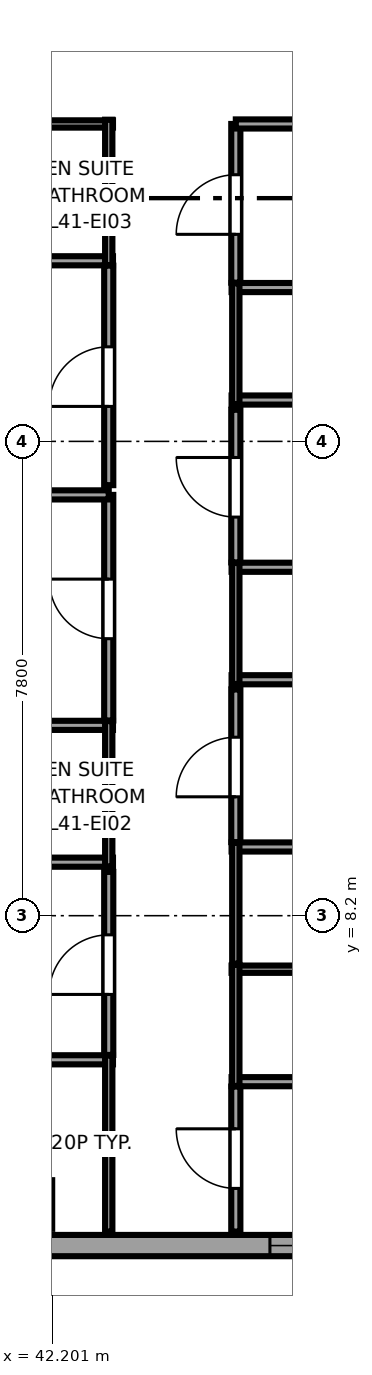
"""IFC4 building model, lengths in metres.
Left out: names, types, materials, properties, quantities, classifications, styles, units other than length and angle.
Written with IfcOpenShell. Run it as: python <this file> out.ifc"""

import sys

from ifc_helpers import new_model, si_unit, direction, frame, frame_2d, origin, origin_2d, place, context, subcontext, project, spatial, rectangle, extrude, source, transform, mapped, element, fill, save


model = new_model("IFC4")
c1 = context("Model", 3, precision=1e-05, world=origin(), true_north=direction((0.0, 1.0)))
c2 = subcontext(c1, "Body", "Model", "MODEL_VIEW")
j1 = project(units=[si_unit("LENGTHUNIT", "METRE"), si_unit("PLANEANGLEUNIT", "RADIAN")], contexts=[c1])
p1 = place(None, origin())
s1 = spatial("IfcSite", under=j1, at=p1, CompositionType="ELEMENT")
p2 = place(p1, origin())
s2 = spatial("IfcBuilding", under=s1, at=p2, CompositionType="ELEMENT")
p3 = place(p2, frame((0.0, 0.0, 157.7)))
s3 = spatial("IfcBuildingStorey", under=s2, at=p3, CompositionType="ELEMENT", Elevation=157.7)
m1 = source(origin(), c2, "Body", "SweptSolid", [
    extrude(rectangle(XDim=0.8, YDim=0.8, at=origin_2d()), origin(), (0.0, 0.0, 1.0), 3.55),
])
p4 = place(p3, frame((41.8, 3.45, 0.0), z_axis=(0.0, 0.0, 1.0), x_axis=(1.0, 0.0, 0.0)))
e1 = element("IfcColumn", 1, at=p4, inside=s3, PredefinedType="COLUMN", context=c2, shape_type="MappedRepresentation", body=[
    mapped(m1, transform((0.0, 0.0, 0.0), x_axis=(1.0, 0.0, 0.0), y_axis=(0.0, 1.0, 0.0), z_axis=(0.0, 0.0, 1.0), scale=1.0)),
])
p5 = place(p3, frame((34.375, 2.775, 0.0), z_axis=(0.0, 0.0, 1.0), x_axis=(1.0, 0.0, 0.0)))
e2 = element("IfcWall", 2, at=p5, inside=s3, PredefinedType="SOLIDWALL", context=c2, shape_type="SweptSolid", body=[
    extrude(rectangle(XDim=15.608, YDim=0.35, at=frame_2d((7.804, 0.0))), origin(), (0.0, 0.0, 1.0), 3.37),
])
p6 = place(p5, frame((1.801, 0.0, 0.68)))
e3 = element("IfcOpeningElement", 3, at=p6, cuts=e2, PredefinedType="OPENING", context=c2, shape_type="SweptSolid", body=[
    extrude(rectangle(XDim=2.4, YDim=1.9, at=frame_2d((1.2, 0.95))), frame((0.0, 0.185, 0.0), z_axis=(0.0, -1.0, 0.0), x_axis=(1.0, 0.0, 0.0)), (0.0, 0.0, 1.0), 0.37),
])
p7 = place(p5, frame((11.406, 0.0, 0.68)))
e4 = element("IfcOpeningElement", 4, at=p7, cuts=e2, PredefinedType="OPENING", context=c2, shape_type="SweptSolid", body=[
    extrude(rectangle(XDim=2.4, YDim=1.9, at=frame_2d((1.2, 0.95))), frame((0.0, 0.185, 0.0), z_axis=(0.0, -1.0, 0.0), x_axis=(1.0, 0.0, 0.0)), (0.0, 0.0, 1.0), 0.37),
])
p8 = place(p3, frame((39.46, 5.83, 0.0), z_axis=(0.0, 0.0, 1.0), x_axis=(1.0, 0.0, 0.0)))
e5 = element("IfcWall", 5, at=p8, inside=s3, PredefinedType="PARTITIONING", context=c2, shape_type="SweptSolid", body=[
    extrude(rectangle(XDim=3.74, YDim=0.15, at=frame_2d((1.87, 0.0))), origin(), (0.0, 0.0, 1.0), 3.37),
])
p9 = place(p3, frame((43.13, 3.005, 0.0), z_axis=(0.0, 0.0, 1.0), x_axis=(0.0, 1.0, 0.0)))
e6 = element("IfcWall", 6, at=p9, inside=s3, PredefinedType="PLUMBINGWALL", context=c2, shape_type="SweptSolid", body=[
    extrude(rectangle(XDim=2.895, YDim=0.12, at=frame_2d((1.448, 0.0))), origin(), (0.0, 0.0, 1.0), 3.37),
])
p10 = place(p3, frame((34.65, 9.08, 0.0), z_axis=(0.0, 0.0, 1.0), x_axis=(1.0, 0.0, 0.0)))
e7 = element("IfcWall", 7, at=p10, inside=s3, PredefinedType="PARTITIONING", context=c2, shape_type="SweptSolid", body=[
    extrude(rectangle(XDim=8.55, YDim=0.15, at=frame_2d((4.275, 0.0))), origin(), (0.0, 0.0, 1.0), 3.37),
])
p11 = place(p3, frame((40.61, 11.33, 0.0), z_axis=(0.0, 0.0, 1.0), x_axis=(1.0, 0.0, 0.0)))
e8 = element("IfcWall", 8, at=p11, inside=s3, PredefinedType="PARTITIONING", context=c2, shape_type="SweptSolid", body=[
    extrude(rectangle(XDim=2.59, YDim=0.15, at=frame_2d((1.295, 0.0))), origin(), (0.0, 0.0, 1.0), 3.37),
])
p12 = place(p3, frame((43.13, 9.01, 0.0), z_axis=(0.0, 0.0, 1.0), x_axis=(0.0, 1.0, 0.0)))
e9 = element("IfcWall", 9, at=p12, inside=s3, PredefinedType="PLUMBINGWALL", context=c2, shape_type="SweptSolid", body=[
    extrude(rectangle(XDim=2.39, YDim=0.12, at=frame_2d((1.195, 0.0))), origin(), (0.0, 0.0, 1.0), 3.37),
])
p13 = place(p3, frame((40.61, 18.97, 0.0), z_axis=(0.0, 0.0, 1.0), x_axis=(1.0, 0.0, 0.0)))
e10 = element("IfcWall", 10, at=p13, inside=s3, PredefinedType="PARTITIONING", context=c2, shape_type="SweptSolid", body=[
    extrude(rectangle(XDim=2.59, YDim=0.15, at=frame_2d((1.295, 0.0))), origin(), (0.0, 0.0, 1.0), 3.37),
])
p14 = place(p3, frame((40.61, 21.22, 0.0), z_axis=(0.0, 0.0, 1.0), x_axis=(1.0, 0.0, 0.0)))
e11 = element("IfcWall", 11, at=p14, inside=s3, PredefinedType="PLUMBINGWALL", context=c2, shape_type="SweptSolid", body=[
    extrude(rectangle(XDim=2.59, YDim=0.12, at=frame_2d((1.295, 0.0))), origin(), (0.0, 0.0, 1.0), 3.37),
])
p15 = place(p3, frame((43.13, 18.9, 0.0), z_axis=(0.0, 0.0, 1.0), x_axis=(0.0, 1.0, 0.0)))
e12 = element("IfcWall", 12, at=p15, inside=s3, PredefinedType="PLUMBINGWALL", context=c2, shape_type="SweptSolid", body=[
    extrude(rectangle(XDim=2.39, YDim=0.12, at=frame_2d((1.195, 0.0))), origin(), (0.0, 0.0, 1.0), 3.37),
])
p16 = place(p3, frame((45.15, 5.47, 0.0), z_axis=(0.0, 0.0, 1.0), x_axis=(1.0, 0.0, 0.0)))
e13 = element("IfcWall", 13, at=p16, inside=s3, PredefinedType="PARTITIONING", context=c2, shape_type="SweptSolid", body=[
    extrude(rectangle(XDim=2.59, YDim=0.15, at=frame_2d((1.295, 0.0))), origin(), (0.0, 0.0, 1.0), 3.37),
])
p17 = place(p3, frame((45.15, 7.32, 0.0), z_axis=(0.0, 0.0, 1.0), x_axis=(1.0, 0.0, 0.0)))
e14 = element("IfcWall", 14, at=p17, inside=s3, PredefinedType="PLUMBINGWALL", context=c2, shape_type="SweptSolid", body=[
    extrude(rectangle(XDim=2.59, YDim=0.12, at=frame_2d((1.295, 0.0))), origin(), (0.0, 0.0, 1.0), 3.37),
])
p18 = place(p3, frame((45.22, 5.4, 0.0), z_axis=(0.0, 0.0, 1.0), x_axis=(0.0, 1.0, 0.0)))
e15 = element("IfcWall", 15, at=p18, inside=s3, PredefinedType="PLUMBINGWALL", context=c2, shape_type="SweptSolid", body=[
    extrude(rectangle(XDim=1.99, YDim=0.12, at=frame_2d((0.995, 0.0))), origin(), (0.0, 0.0, 1.0), 3.37),
])
p19 = place(p3, frame((45.15, 9.33, 0.0), z_axis=(0.0, 0.0, 1.0), x_axis=(1.0, 0.0, 0.0)))
e16 = element("IfcWall", 16, at=p19, inside=s3, PredefinedType="PARTITIONING", context=c2, shape_type="SweptSolid", body=[
    extrude(rectangle(XDim=2.59, YDim=0.15, at=frame_2d((1.295, 0.0))), origin(), (0.0, 0.0, 1.0), 3.37),
])
p20 = place(p3, frame((45.22, 7.41, 0.0), z_axis=(0.0, 0.0, 1.0), x_axis=(0.0, 1.0, 0.0)))
e17 = element("IfcWall", 17, at=p20, inside=s3, PredefinedType="PLUMBINGWALL", context=c2, shape_type="SweptSolid", body=[
    extrude(rectangle(XDim=1.99, YDim=0.12, at=frame_2d((0.995, 0.0))), origin(), (0.0, 0.0, 1.0), 3.37),
])
p21 = place(p3, frame((45.15, 12.08, 0.0), z_axis=(0.0, 0.0, 1.0), x_axis=(1.0, 0.0, 0.0)))
e18 = element("IfcWall", 18, at=p21, inside=s3, PredefinedType="PARTITIONING", context=c2, shape_type="SweptSolid", body=[
    extrude(rectangle(XDim=8.845, YDim=0.15, at=frame_2d((4.423, 0.0))), origin(), (0.0, 0.0, 1.0), 3.37),
])
p22 = place(p3, frame((45.15, 13.93, 0.0), z_axis=(0.0, 0.0, 1.0), x_axis=(1.0, 0.0, 0.0)))
e19 = element("IfcWall", 19, at=p22, inside=s3, PredefinedType="PARTITIONING", context=c2, shape_type="SweptSolid", body=[
    extrude(rectangle(XDim=2.59, YDim=0.15, at=frame_2d((1.295, 0.0))), origin(), (0.0, 0.0, 1.0), 3.37),
])
p23 = place(p3, frame((45.22, 12.01, 0.0), z_axis=(0.0, 0.0, 1.0), x_axis=(0.0, 1.0, 0.0)))
e20 = element("IfcWall", 20, at=p23, inside=s3, PredefinedType="PLUMBINGWALL", context=c2, shape_type="SweptSolid", body=[
    extrude(rectangle(XDim=1.99, YDim=0.12, at=frame_2d((0.995, 0.0))), origin(), (0.0, 0.0, 1.0), 3.37),
])
p24 = place(p3, frame((45.15, 16.68, 0.0), z_axis=(0.0, 0.0, 1.0), x_axis=(1.0, 0.0, 0.0)))
e21 = element("IfcWall", 21, at=p24, inside=s3, PredefinedType="PARTITIONING", context=c2, shape_type="SweptSolid", body=[
    extrude(rectangle(XDim=8.845, YDim=0.15, at=frame_2d((4.423, 0.0))), origin(), (0.0, 0.0, 1.0), 3.37),
])
p25 = place(p3, frame((45.15, 18.53, 0.0), z_axis=(0.0, 0.0, 1.0), x_axis=(1.0, 0.0, 0.0)))
e22 = element("IfcWall", 22, at=p25, inside=s3, PredefinedType="PARTITIONING", context=c2, shape_type="SweptSolid", body=[
    extrude(rectangle(XDim=2.59, YDim=0.15, at=frame_2d((1.295, 0.0))), origin(), (0.0, 0.0, 1.0), 3.37),
])
p26 = place(p3, frame((45.22, 16.61, 0.0), z_axis=(0.0, 0.0, 1.0), x_axis=(0.0, 1.0, 0.0)))
e23 = element("IfcWall", 23, at=p26, inside=s3, PredefinedType="PLUMBINGWALL", context=c2, shape_type="SweptSolid", body=[
    extrude(rectangle(XDim=1.99, YDim=0.12, at=frame_2d((0.995, 0.0))), origin(), (0.0, 0.0, 1.0), 3.37),
])
p27 = place(p3, frame((43.13, 5.91, 0.0), z_axis=(0.0, 0.0, 1.0), x_axis=(0.0, 1.0, 0.0)))
e24 = element("IfcWall", 24, at=p27, inside=s3, PredefinedType="PARTITIONING", context=c2, shape_type="SweptSolid", body=[
    extrude(rectangle(XDim=3.01, YDim=0.15, at=frame_2d((1.505, 0.0))), origin(), (0.0, 0.0, 1.0), 3.37),
])
p28 = place(p27, frame((0.995, 0.0, 0.0)))
e25 = element("IfcOpeningElement", 25, at=p28, cuts=e24, PredefinedType="OPENING", context=c2, shape_type="SweptSolid", body=[
    extrude(rectangle(XDim=0.98, YDim=2.12, at=frame_2d((0.49, 1.06))), frame((0.0, 0.085, 0.0), z_axis=(0.0, -1.0, 0.0), x_axis=(1.0, 0.0, 0.0)), (0.0, 0.0, 1.0), 0.17),
])
p29 = place(p3, frame((43.13, 11.41, 0.0), z_axis=(0.0, 0.0, 1.0), x_axis=(0.0, 1.0, 0.0)))
e26 = element("IfcWall", 26, at=p29, inside=s3, PredefinedType="PARTITIONING", context=c2, shape_type="SweptSolid", body=[
    extrude(rectangle(XDim=3.71, YDim=0.15, at=frame_2d((1.855, 0.0))), origin(), (0.0, 0.0, 1.0), 3.37),
])
p30 = place(p29, frame((1.345, 0.0, 0.0)))
e27 = element("IfcOpeningElement", 27, at=p30, cuts=e26, PredefinedType="OPENING", context=c2, shape_type="SweptSolid", body=[
    extrude(rectangle(XDim=0.98, YDim=2.12, at=frame_2d((0.49, 1.06))), frame((0.0, 0.085, 0.0), z_axis=(0.0, -1.0, 0.0), x_axis=(1.0, 0.0, 0.0)), (0.0, 0.0, 1.0), 0.17),
])
p31 = place(p3, frame((34.65, 15.12, 0.0), z_axis=(0.0, 0.0, 1.0), x_axis=(1.0, 0.0, 0.0)))
e28 = element("IfcWall", 28, at=p31, inside=s3, PredefinedType="PARTITIONING", context=c2, shape_type="SweptSolid", body=[
    extrude(rectangle(XDim=8.48, YDim=0.15, at=frame_2d((4.24, 0.0))), origin(), (0.0, 0.0, 1.0), 3.37),
])
p32 = place(p3, frame((43.13, 15.28, 0.0), z_axis=(0.0, 0.0, 1.0), x_axis=(0.0, 1.0, 0.0)))
e29 = element("IfcWall", 29, at=p32, inside=s3, PredefinedType="PARTITIONING", context=c2, shape_type="SweptSolid", body=[
    extrude(rectangle(XDim=3.61, YDim=0.15, at=frame_2d((1.805, 0.0))), origin(), (0.0, 0.0, 1.0), 3.37),
])
p33 = place(p32, frame((1.295, 0.0, 0.0)))
e30 = element("IfcOpeningElement", 30, at=p33, cuts=e29, PredefinedType="OPENING", context=c2, shape_type="SweptSolid", body=[
    extrude(rectangle(XDim=0.98, YDim=2.12, at=frame_2d((0.49, 1.06))), frame((0.0, 0.085, 0.0), z_axis=(0.0, -1.0, 0.0), x_axis=(1.0, 0.0, 0.0)), (0.0, 0.0, 1.0), 0.17),
])
p34 = place(p3, frame((45.22, 3.005, 0.0), z_axis=(0.0, 0.0, 1.0), x_axis=(0.0, 1.0, 0.0)))
e31 = element("IfcWall", 31, at=p34, inside=s3, PredefinedType="PARTITIONING", context=c2, shape_type="SweptSolid", body=[
    extrude(rectangle(XDim=2.385, YDim=0.15, at=frame_2d((1.192, 0.0))), origin(), (0.0, 0.0, 1.0), 3.37),
])
p35 = place(p34, frame((0.71, 0.0, 0.0)))
e32 = element("IfcOpeningElement", 32, at=p35, cuts=e31, PredefinedType="OPENING", context=c2, shape_type="SweptSolid", body=[
    extrude(rectangle(XDim=0.98, YDim=2.12, at=frame_2d((0.49, 1.06))), frame((0.0, 0.085, 0.0), z_axis=(0.0, -1.0, 0.0), x_axis=(1.0, 0.0, 0.0)), (0.0, 0.0, 1.0), 0.17),
])
p36 = place(p3, frame((45.22, 9.41, 0.0), z_axis=(0.0, 0.0, 1.0), x_axis=(0.0, 1.0, 0.0)))
e33 = element("IfcWall", 33, at=p36, inside=s3, PredefinedType="PARTITIONING", context=c2, shape_type="SweptSolid", body=[
    extrude(rectangle(XDim=2.51, YDim=0.15, at=frame_2d((1.255, 0.0))), origin(), (0.0, 0.0, 1.0), 3.37),
])
p37 = place(p36, frame((0.745, 0.0, 0.0)))
e34 = element("IfcOpeningElement", 34, at=p37, cuts=e33, PredefinedType="OPENING", context=c2, shape_type="SweptSolid", body=[
    extrude(rectangle(XDim=0.98, YDim=2.12, at=frame_2d((0.49, 1.06))), frame((0.0, 0.085, 0.0), z_axis=(0.0, -1.0, 0.0), x_axis=(1.0, 0.0, 0.0)), (0.0, 0.0, 1.0), 0.17),
])
p38 = place(p3, frame((45.22, 14.01, 0.0), z_axis=(0.0, 0.0, 1.0), x_axis=(0.0, 1.0, 0.0)))
e35 = element("IfcWall", 35, at=p38, inside=s3, PredefinedType="PARTITIONING", context=c2, shape_type="SweptSolid", body=[
    extrude(rectangle(XDim=2.51, YDim=0.15, at=frame_2d((1.255, 0.0))), origin(), (0.0, 0.0, 1.0), 3.37),
])
p39 = place(p38, frame((0.745, 0.0, 0.0)))
e36 = element("IfcOpeningElement", 36, at=p39, cuts=e35, PredefinedType="OPENING", context=c2, shape_type="SweptSolid", body=[
    extrude(rectangle(XDim=0.98, YDim=2.12, at=frame_2d((0.49, 1.06))), frame((0.0, 0.085, 0.0), z_axis=(0.0, -1.0, 0.0), x_axis=(1.0, 0.0, 0.0)), (0.0, 0.0, 1.0), 0.17),
])
p40 = place(p3, frame((45.22, 18.61, 0.0), z_axis=(0.0, 0.0, 1.0), x_axis=(0.0, 1.0, 0.0)))
e37 = element("IfcWall", 37, at=p40, inside=s3, PredefinedType="PARTITIONING", context=c2, shape_type="SweptSolid", body=[
    extrude(rectangle(XDim=2.61, YDim=0.15, at=frame_2d((1.305, 0.0))), origin(), (0.0, 0.0, 1.0), 3.37),
])
p41 = place(p40, frame((0.795, 0.0, 0.0)))
e38 = element("IfcOpeningElement", 38, at=p41, cuts=e37, PredefinedType="OPENING", context=c2, shape_type="SweptSolid", body=[
    extrude(rectangle(XDim=0.98, YDim=2.12, at=frame_2d((0.49, 1.06))), frame((0.0, 0.085, 0.0), z_axis=(0.0, -1.0, 0.0), x_axis=(1.0, 0.0, 0.0)), (0.0, 0.0, 1.0), 0.17),
])
p42 = place(p3, frame((45.22, 21.22, 0.0), z_axis=(0.0, 0.0, 1.0), x_axis=(1.0, 0.0, 0.0)))
e39 = element("IfcWall", 39, at=p42, inside=s3, PredefinedType="PARTITIONING", context=c2, shape_type="SweptSolid", body=[
    extrude(rectangle(XDim=8.775, YDim=0.15, at=frame_2d((4.388, 0.0))), origin(), (0.0, 0.0, 1.0), 3.37),
])
m2 = source(origin(), c2, "Body", "SweptSolid", [
    extrude(rectangle(XDim=2.4, YDim=1.9, at=frame_2d((1.2, 0.95))), frame((0.0, 0.09, 0.0), z_axis=(0.0, -1.0, 0.0), x_axis=(1.0, 0.0, 0.0)), (0.0, 0.0, 1.0), 0.06),
])
p43 = place(p7, origin())
e40 = element("IfcWindow", 40, at=p43, inside=s3, PartitioningType="TRIPLE_PANEL_HORIZONTAL", PredefinedType="WINDOW", context=c2, shape_type="MappedRepresentation", body=[
    mapped(m2, transform((0.0, 0.0, 0.0), x_axis=(1.0, 0.0, 0.0), y_axis=(0.0, 1.0, 0.0), z_axis=(0.0, 0.0, 1.0), scale=1.0)),
])
fill(e4, e40)
m3 = source(origin(), c2, "Body", "SweptSolid", [
    extrude(rectangle(XDim=0.98, YDim=2.12, at=frame_2d((0.49, 1.06))), frame((0.0, 0.025, 0.0), z_axis=(0.0, -1.0, 0.0), x_axis=(1.0, 0.0, 0.0)), (0.0, 0.0, 1.0), 0.05),
])
p44 = place(p28, origin())
e41 = element("IfcDoor", 41, at=p44, inside=s3, OperationType="SINGLE_SWING_LEFT", PredefinedType="DOOR", context=c2, shape_type="MappedRepresentation", body=[
    mapped(m3, transform((0.0, 0.0, 0.0), x_axis=(1.0, 0.0, 0.0), y_axis=(0.0, 1.0, 0.0), z_axis=(0.0, 0.0, 1.0), scale=1.0)),
])
fill(e25, e41)
p45 = place(p30, origin())
e42 = element("IfcDoor", 42, at=p45, inside=s3, OperationType="SINGLE_SWING_RIGHT", PredefinedType="DOOR", context=c2, shape_type="MappedRepresentation", body=[
    mapped(m3, transform((0.0, 0.0, 0.0), x_axis=(1.0, 0.0, 0.0), y_axis=(0.0, 1.0, 0.0), z_axis=(0.0, 0.0, 1.0), scale=1.0)),
])
fill(e27, e42)
p46 = place(p33, origin())
e43 = element("IfcDoor", 43, at=p46, inside=s3, OperationType="SINGLE_SWING_LEFT", PredefinedType="DOOR", context=c2, shape_type="MappedRepresentation", body=[
    mapped(m3, transform((0.0, 0.0, 0.0), x_axis=(1.0, 0.0, 0.0), y_axis=(0.0, 1.0, 0.0), z_axis=(0.0, 0.0, 1.0), scale=1.0)),
])
fill(e30, e43)
p47 = place(p35, origin())
e44 = element("IfcDoor", 44, at=p47, inside=s3, OperationType="SINGLE_SWING_RIGHT", PredefinedType="DOOR", context=c2, shape_type="MappedRepresentation", body=[
    mapped(m3, transform((0.0, 0.0, 0.0), x_axis=(1.0, 0.0, 0.0), y_axis=(0.0, 1.0, 0.0), z_axis=(0.0, 0.0, 1.0), scale=1.0)),
])
fill(e32, e44)
p48 = place(p37, origin())
e45 = element("IfcDoor", 45, at=p48, inside=s3, OperationType="SINGLE_SWING_LEFT", PredefinedType="DOOR", context=c2, shape_type="MappedRepresentation", body=[
    mapped(m3, transform((0.0, 0.0, 0.0), x_axis=(1.0, 0.0, 0.0), y_axis=(0.0, 1.0, 0.0), z_axis=(0.0, 0.0, 1.0), scale=1.0)),
])
fill(e34, e45)
p49 = place(p39, origin())
e46 = element("IfcDoor", 46, at=p49, inside=s3, OperationType="SINGLE_SWING_RIGHT", PredefinedType="DOOR", context=c2, shape_type="MappedRepresentation", body=[
    mapped(m3, transform((0.0, 0.0, 0.0), x_axis=(1.0, 0.0, 0.0), y_axis=(0.0, 1.0, 0.0), z_axis=(0.0, 0.0, 1.0), scale=1.0)),
])
fill(e36, e46)
p50 = place(p41, origin())
e47 = element("IfcDoor", 47, at=p50, inside=s3, OperationType="SINGLE_SWING_LEFT", PredefinedType="DOOR", context=c2, shape_type="MappedRepresentation", body=[
    mapped(m3, transform((0.0, 0.0, 0.0), x_axis=(1.0, 0.0, 0.0), y_axis=(0.0, 1.0, 0.0), z_axis=(0.0, 0.0, 1.0), scale=1.0)),
])
fill(e38, e47)
save(model, sys.argv[1])
